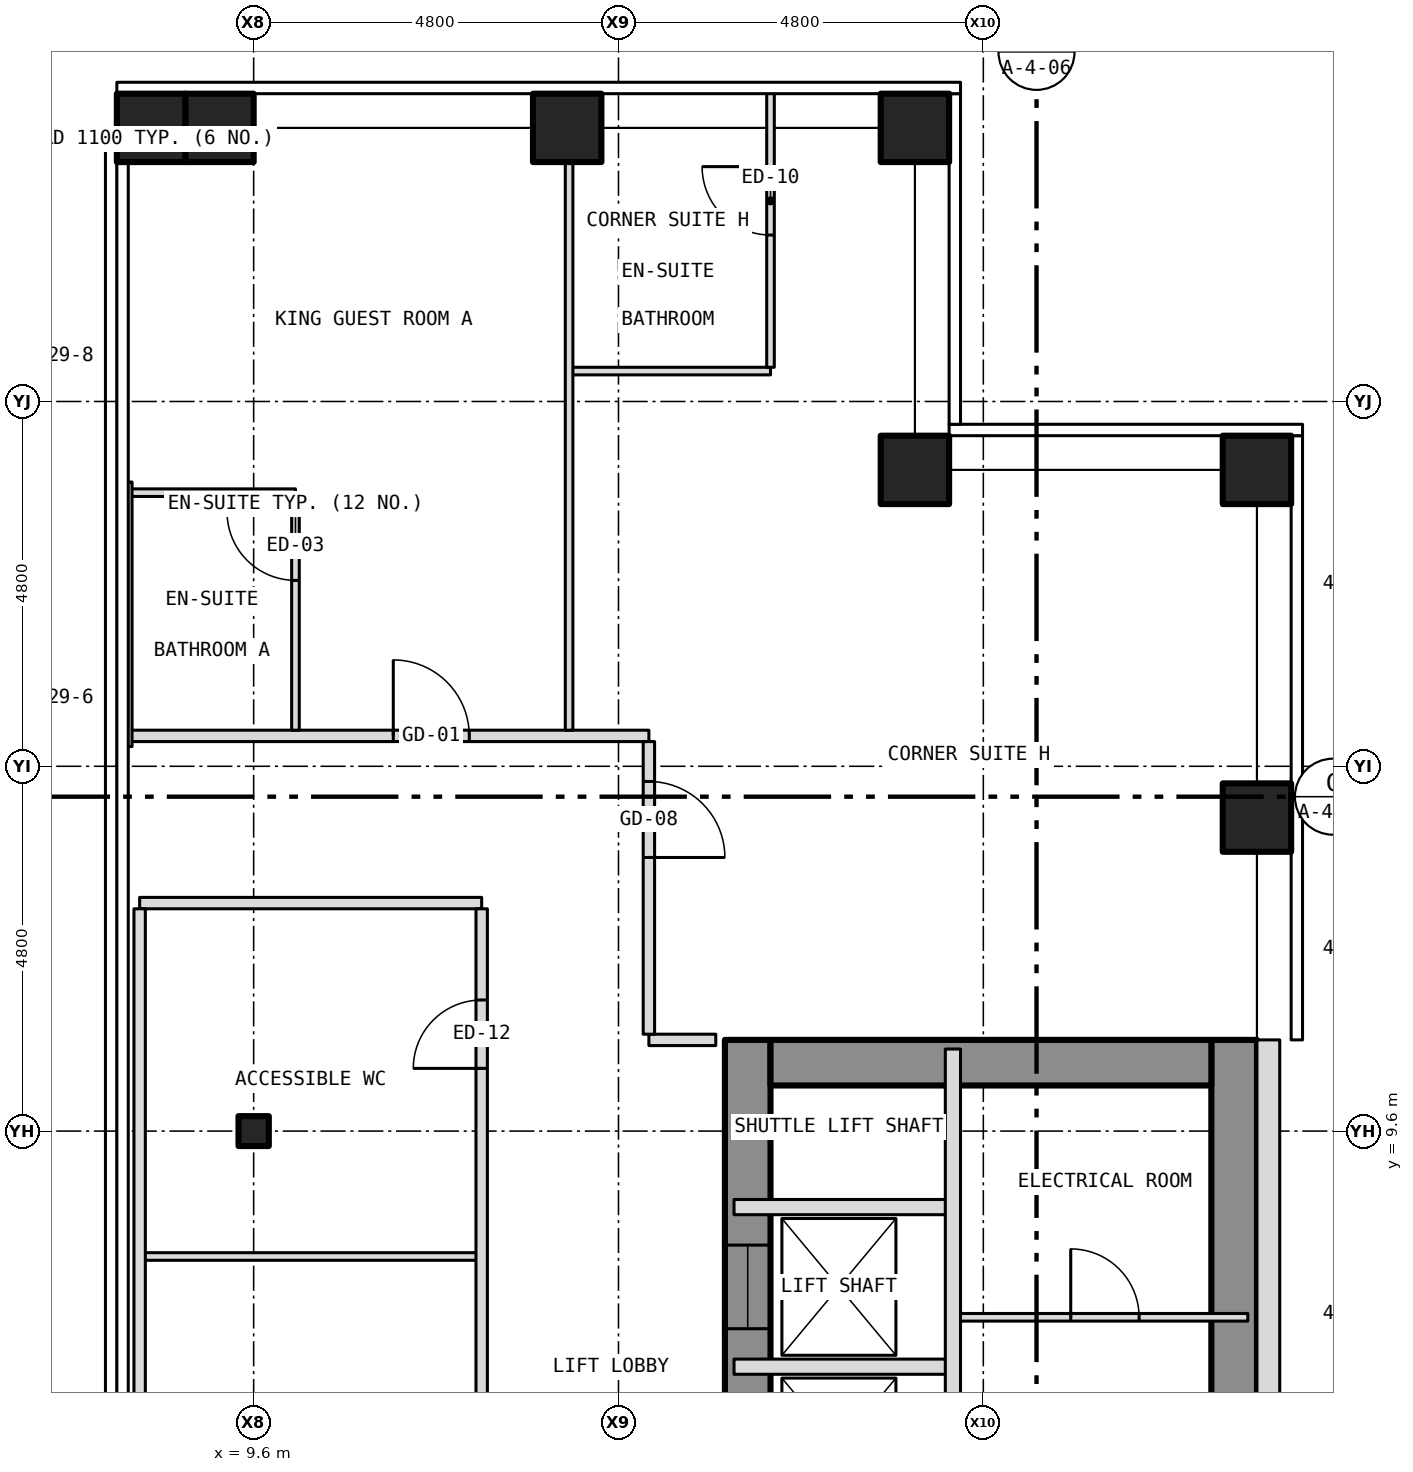
"""IFC4 building model, lengths in metres.
Left out: names, types, materials, properties, quantities, classifications, styles, units other than length and angle.
Written with IfcOpenShell. Run it as: python <this file> out.ifc"""

import sys

from ifc_helpers import new_model, si_unit, direction, frame, frame_2d, origin, origin_2d, place, context, subcontext, project, spatial, rectangle, hollow_rectangle, i_section, extrude, element, fill, save


model = new_model("IFC4")
c1 = context("Model", 3, precision=1e-05, world=origin(), true_north=direction((0.0, 1.0)))
c2 = subcontext(c1, "Body", "Model", "MODEL_VIEW")
j1 = project(units=[si_unit("LENGTHUNIT", "METRE"), si_unit("PLANEANGLEUNIT", "RADIAN")], contexts=[c1])
p1 = place(None, origin())
s1 = spatial("IfcSite", under=j1, at=p1, CompositionType="ELEMENT")
p2 = place(p1, origin())
s2 = spatial("IfcBuilding", under=s1, at=p2, CompositionType="ELEMENT")
p3 = place(p2, frame((0.0, 0.0, 117.0)))
s3 = spatial("IfcBuildingStorey", under=s2, at=p3, CompositionType="ELEMENT", Elevation=117.0)
for number, where, z_axis, x_axis in (
    (1, (9.15, 22.8, -0.15), (0.0, 0.0, 1.0), (1.0, 0.0, 0.0)),
    (2, (13.725, 22.8, -0.15), (0.0, 0.0, 1.0), (1.0, 0.0, 0.0)),
    (3, (18.3, 22.8, -0.15), (0.0, 0.0, 1.0), (1.0, 0.0, 0.0)),
    (4, (22.8, 13.725, -0.15), (0.0, 0.0, 1.0), (1.0, 0.0, 0.0)),
    (5, (22.8, 18.3, -0.15), (0.0, 0.0, 1.0), (1.0, 0.0, 0.0)),
    (6, (18.3, 18.3, -0.15), (0.0, 0.0, 1.0), (1.0, 0.0, 0.0)),
    (7, (8.25, 22.8, -0.15), (0.0, 0.0, 1.0), (1.0, 0.0, 0.0)),
):
    element("IfcColumn", number, at=place(p3, frame(where, z_axis=z_axis, x_axis=x_axis)), inside=s3, PredefinedType="COLUMN", context=c2, shape_type="SweptSolid", body=[
        extrude(hollow_rectangle(XDim=0.9, YDim=0.9, WallThickness=0.05, at=origin_2d()), origin(), (0.0, 0.0, 1.0), 3.5),
    ])
p4 = place(p3, frame((9.6, 9.6, -0.15), z_axis=(0.0, 0.0, 1.0), x_axis=(1.0, 0.0, 0.0)))
e8 = element("IfcColumn", 8, at=p4, inside=s3, PredefinedType="COLUMN", context=c2, shape_type="SweptSolid", body=[
    extrude(i_section(OverallWidth=0.399, OverallDepth=0.394, WebThickness=0.023, FlangeThickness=0.037, at=origin_2d()), origin(), (0.0, 0.0, 1.0), 3.5),
])
p5 = place(p3, frame((16.1, -10.8, 0.0), z_axis=(0.0, 0.0, 1.0), x_axis=(0.0, 1.0, 0.0)))
e9 = element("IfcWall", 9, at=p5, inside=s3, PredefinedType="SHEAR", context=c2, shape_type="SweptSolid", body=[
    extrude(rectangle(XDim=21.6, YDim=0.6, at=frame_2d((10.8, 0.0))), origin(), (0.0, 0.0, 1.0), 3.25),
])
p6 = place(p5, frame((9.4, 0.0, 0.0)))
e10 = element("IfcOpeningElement", 10, at=p6, cuts=e9, PredefinedType="OPENING", context=c2, shape_type="SweptSolid", body=[
    extrude(rectangle(XDim=1.1, YDim=2.1, at=frame_2d((0.55, 1.05))), frame((0.0, 0.312, 0.0), z_axis=(0.0, -1.0, 0.0), x_axis=(1.0, 0.0, 0.0)), (0.0, 0.0, 1.0), 0.624),
])
p7 = place(p5, frame((11.5, 0.0, 0.0)))
e11 = element("IfcOpeningElement", 11, at=p7, cuts=e9, PredefinedType="OPENING", context=c2, shape_type="SweptSolid", body=[
    extrude(rectangle(XDim=1.1, YDim=2.1, at=frame_2d((0.55, 1.05))), frame((0.0, 0.312, 0.0), z_axis=(0.0, -1.0, 0.0), x_axis=(1.0, 0.0, 0.0)), (0.0, 0.0, 1.0), 0.624),
])
p8 = place(p5, frame((13.6, 0.0, 0.0)))
e12 = element("IfcOpeningElement", 12, at=p8, cuts=e9, PredefinedType="OPENING", context=c2, shape_type="SweptSolid", body=[
    extrude(rectangle(XDim=1.1, YDim=2.1, at=frame_2d((0.55, 1.05))), frame((0.0, 0.312, 0.0), z_axis=(0.0, -1.0, 0.0), x_axis=(1.0, 0.0, 0.0)), (0.0, 0.0, 1.0), 0.624),
])
p9 = place(p5, frame((15.7, 0.0, 0.0)))
e13 = element("IfcOpeningElement", 13, at=p9, cuts=e9, PredefinedType="OPENING", context=c2, shape_type="SweptSolid", body=[
    extrude(rectangle(XDim=1.1, YDim=2.1, at=frame_2d((0.55, 1.05))), frame((0.0, 0.312, 0.0), z_axis=(0.0, -1.0, 0.0), x_axis=(1.0, 0.0, 0.0)), (0.0, 0.0, 1.0), 0.624),
])
p10 = place(p5, frame((17.8, 0.0, 0.0)))
e14 = element("IfcOpeningElement", 14, at=p10, cuts=e9, PredefinedType="OPENING", context=c2, shape_type="SweptSolid", body=[
    extrude(rectangle(XDim=1.1, YDim=2.1, at=frame_2d((0.55, 1.05))), frame((0.0, 0.312, 0.0), z_axis=(0.0, -1.0, 0.0), x_axis=(1.0, 0.0, 0.0)), (0.0, 0.0, 1.0), 0.624),
])
p11 = place(p5, frame((5.642, 0.0, 0.0)))
e15 = element("IfcOpeningElement", 15, at=p11, cuts=e9, PredefinedType="OPENING", context=c2, shape_type="SweptSolid", body=[
    extrude(rectangle(XDim=1.1, YDim=2.1, at=frame_2d((0.55, 1.05))), frame((0.0, 0.312, 0.0), z_axis=(0.0, -1.0, 0.0), x_axis=(1.0, 0.0, 0.0)), (0.0, 0.0, 1.0), 0.624),
])
p12 = place(p5, frame((7.5, 0.0, 0.0)))
e16 = element("IfcOpeningElement", 16, at=p12, cuts=e9, PredefinedType="OPENING", context=c2, shape_type="SweptSolid", body=[
    extrude(rectangle(XDim=1.1, YDim=2.1, at=frame_2d((0.55, 1.05))), frame((0.0, 0.312, 0.0), z_axis=(0.0, -1.0, 0.0), x_axis=(1.0, 0.0, 0.0)), (0.0, 0.0, 1.0), 0.624),
])
p13 = place(p3, frame((22.5, -10.8, 0.0), z_axis=(0.0, 0.0, 1.0), x_axis=(0.0, 1.0, 0.0)))
e17 = element("IfcWall", 17, at=p13, inside=s3, PredefinedType="SHEAR", context=c2, shape_type="SweptSolid", body=[
    extrude(rectangle(XDim=21.6, YDim=0.6, at=frame_2d((10.8, 0.0))), origin(), (0.0, 0.0, 1.0), 3.25),
])
p14 = place(p3, frame((16.4, 10.5, 0.0), z_axis=(0.0, 0.0, 1.0), x_axis=(1.0, 0.0, 0.0)))
e18 = element("IfcWall", 18, at=p14, inside=s3, PredefinedType="SHEAR", context=c2, shape_type="SweptSolid", body=[
    extrude(rectangle(XDim=5.8, YDim=0.6, at=frame_2d((2.9, 0.0))), origin(), (0.0, 0.0, 1.0), 3.25),
])
p15 = place(p3, frame((22.95, -10.8, 0.0), z_axis=(0.0, 0.0, 1.0), x_axis=(0.0, 1.0, 0.0)))
e19 = element("IfcWall", 19, at=p15, inside=s3, PredefinedType="SOLIDWALL", context=c2, shape_type="SweptSolid", body=[
    extrude(rectangle(XDim=21.6, YDim=0.3, at=frame_2d((10.8, 0.0))), origin(), (0.0, 0.0, 1.0), 3.5),
])
p16 = place(p15, frame((2.95, 0.0, 1.0)))
e20 = element("IfcOpeningElement", 20, at=p16, cuts=e19, PredefinedType="OPENING", context=c2, shape_type="SweptSolid", body=[
    extrude(rectangle(XDim=0.6, YDim=1.5, at=frame_2d((0.3, 0.75))), frame((0.0, 0.162, 0.0), z_axis=(0.0, -1.0, 0.0), x_axis=(1.0, 0.0, 0.0)), (0.0, 0.0, 1.0), 0.324),
])
p17 = place(p3, frame((15.92, 6.5, 0.0), z_axis=(0.0, 0.0, 1.0), x_axis=(1.0, 0.0, 0.0)))
e21 = element("IfcWall", 21, at=p17, inside=s3, PredefinedType="PARTITIONING", context=c2, shape_type="SweptSolid", body=[
    extrude(rectangle(XDim=2.88, YDim=0.2, at=frame_2d((1.44, 0.0))), origin(), (0.0, 0.0, 1.0), 3.25),
])
p18 = place(p3, frame((18.8, 7.15, 0.0), z_axis=(0.0, 0.0, 1.0), x_axis=(1.0, 0.0, 0.0)))
e22 = element("IfcWall", 22, at=p18, inside=s3, PredefinedType="PARTITIONING", context=c2, shape_type="SweptSolid", body=[
    extrude(rectangle(XDim=3.88, YDim=0.1, at=frame_2d((1.94, 0.0))), origin(), (0.0, 0.0, 1.0), 3.25),
])
p19 = place(p18, frame((1.55, 0.0, 0.0)))
e23 = element("IfcOpeningElement", 23, at=p19, cuts=e22, PredefinedType="OPENING", context=c2, shape_type="SweptSolid", body=[
    extrude(rectangle(XDim=0.9, YDim=2.1, at=frame_2d((0.45, 1.05))), frame((0.0, 0.062, 0.0), z_axis=(0.0, -1.0, 0.0), x_axis=(1.0, 0.0, 0.0)), (0.0, 0.0, 1.0), 0.124),
])
p20 = place(p3, frame((8.1, 7.95, 0.0), z_axis=(0.0, 0.0, 1.0), x_axis=(1.0, 0.0, 0.0)))
e24 = element("IfcWall", 24, at=p20, inside=s3, PredefinedType="PARTITIONING", context=c2, shape_type="SweptSolid", body=[
    extrude(rectangle(XDim=4.5, YDim=0.1, at=frame_2d((2.25, 0.0))), origin(), (0.0, 0.0, 1.0), 3.35),
])
p21 = place(p3, frame((15.92, 8.6, 0.0), z_axis=(0.0, 0.0, 1.0), x_axis=(1.0, 0.0, 0.0)))
e25 = element("IfcWall", 25, at=p21, inside=s3, PredefinedType="PARTITIONING", context=c2, shape_type="SweptSolid", body=[
    extrude(rectangle(XDim=2.88, YDim=0.2, at=frame_2d((1.44, 0.0))), origin(), (0.0, 0.0, 1.0), 3.25),
])
p22 = place(p3, frame((14.8, 10.8, 0.0), z_axis=(0.0, 0.0, 1.0), x_axis=(1.0, 0.0, 0.0)))
e26 = element("IfcWall", 26, at=p22, inside=s3, PredefinedType="PARTITIONING", context=c2, shape_type="SweptSolid", body=[
    extrude(rectangle(XDim=0.88, YDim=0.15, at=frame_2d((0.44, 0.0))), origin(), (0.0, 0.0, 1.0), 3.35),
])
p23 = place(p3, frame((8.1, 12.6, 0.0), z_axis=(0.0, 0.0, 1.0), x_axis=(1.0, 0.0, 0.0)))
e27 = element("IfcWall", 27, at=p23, inside=s3, PredefinedType="PARTITIONING", context=c2, shape_type="SweptSolid", body=[
    extrude(rectangle(XDim=4.5, YDim=0.15, at=frame_2d((2.25, 0.0))), origin(), (0.0, 0.0, 1.0), 3.35),
])
p24 = place(p3, frame((7.95, 14.8, 0.0), z_axis=(0.0, 0.0, 1.0), x_axis=(1.0, 0.0, 0.0)))
e28 = element("IfcWall", 28, at=p24, inside=s3, PredefinedType="PARTITIONING", context=c2, shape_type="SweptSolid", body=[
    extrude(rectangle(XDim=6.85, YDim=0.15, at=frame_2d((3.425, 0.0))), origin(), (0.0, 0.0, 1.0), 3.35),
])
p25 = place(p24, frame((3.487, 0.0, 0.0)))
e29 = element("IfcOpeningElement", 29, at=p25, cuts=e28, PredefinedType="OPENING", context=c2, shape_type="SweptSolid", body=[
    extrude(rectangle(XDim=1.0, YDim=2.1, at=frame_2d((0.5, 1.05))), frame((0.0, 0.087, 0.0), z_axis=(0.0, -1.0, 0.0), x_axis=(1.0, 0.0, 0.0)), (0.0, 0.0, 1.0), 0.174),
])
p26 = place(p3, frame((7.95, 18.0, 0.0), z_axis=(0.0, 0.0, 1.0), x_axis=(1.0, 0.0, 0.0)))
e30 = element("IfcWall", 30, at=p26, inside=s3, PredefinedType="PARTITIONING", context=c2, shape_type="SweptSolid", body=[
    extrude(rectangle(XDim=2.2, YDim=0.1, at=frame_2d((1.1, 0.0))), origin(), (0.0, 0.0, 1.0), 3.35),
])
p27 = place(p3, frame((13.75, 19.6, 0.0), z_axis=(0.0, 0.0, 1.0), x_axis=(1.0, 0.0, 0.0)))
e31 = element("IfcWall", 31, at=p27, inside=s3, PredefinedType="PARTITIONING", context=c2, shape_type="SweptSolid", body=[
    extrude(rectangle(XDim=2.65, YDim=0.1, at=frame_2d((1.325, 0.0))), origin(), (0.0, 0.0, 1.0), 3.35),
])
p28 = place(p3, frame((7.95, 14.66, 0.0), z_axis=(0.0, 0.0, 1.0), x_axis=(0.0, 1.0, 0.0)))
e32 = element("IfcWall", 32, at=p28, inside=s3, PredefinedType="PARTITIONING", context=c2, shape_type="SweptSolid", body=[
    extrude(rectangle(XDim=3.48, YDim=0.1, at=frame_2d((1.74, 0.0))), origin(), (0.0, 0.0, 1.0), 2.733),
])
p29 = place(p3, frame((8.1, 3.375, 0.0), z_axis=(0.0, 0.0, 1.0), x_axis=(0.0, 1.0, 0.0)))
e33 = element("IfcWall", 33, at=p29, inside=s3, PredefinedType="PARTITIONING", context=c2, shape_type="SweptSolid", body=[
    extrude(rectangle(XDim=9.15, YDim=0.15, at=frame_2d((4.575, 0.0))), origin(), (0.0, 0.0, 1.0), 3.35),
])
p30 = place(p3, frame((10.15, 14.875, 0.0), z_axis=(0.0, 0.0, 1.0), x_axis=(0.0, 1.0, 0.0)))
e34 = element("IfcWall", 34, at=p30, inside=s3, PredefinedType="PARTITIONING", context=c2, shape_type="SweptSolid", body=[
    extrude(rectangle(XDim=3.075, YDim=0.1, at=frame_2d((1.538, 0.0))), origin(), (0.0, 0.0, 1.0), 3.35),
])
p31 = place(p30, frame((1.971, 0.0, 0.0)))
e35 = element("IfcOpeningElement", 35, at=p31, cuts=e34, PredefinedType="OPENING", context=c2, shape_type="SweptSolid", body=[
    extrude(rectangle(XDim=0.9, YDim=2.1, at=frame_2d((0.45, 1.05))), frame((0.0, 0.062, 0.0), z_axis=(0.0, -1.0, 0.0), x_axis=(1.0, 0.0, 0.0)), (0.0, 0.0, 1.0), 0.124),
])
p32 = place(p3, frame((12.6, 3.375, 0.0), z_axis=(0.0, 0.0, 1.0), x_axis=(0.0, 1.0, 0.0)))
e36 = element("IfcWall", 36, at=p32, inside=s3, PredefinedType="PARTITIONING", context=c2, shape_type="SweptSolid", body=[
    extrude(rectangle(XDim=9.15, YDim=0.15, at=frame_2d((4.575, 0.0))), origin(), (0.0, 0.0, 1.0), 3.35),
])
p33 = place(p32, frame((7.05, 0.0, 0.0)))
e37 = element("IfcOpeningElement", 37, at=p33, cuts=e36, PredefinedType="OPENING", context=c2, shape_type="SweptSolid", body=[
    extrude(rectangle(XDim=0.9, YDim=2.1, at=frame_2d((0.45, 1.05))), frame((0.0, 0.087, 0.0), z_axis=(0.0, -1.0, 0.0), x_axis=(1.0, 0.0, 0.0)), (0.0, 0.0, 1.0), 0.174),
])
p34 = place(p3, frame((13.75, 14.875, 0.0), z_axis=(0.0, 0.0, 1.0), x_axis=(0.0, 1.0, 0.0)))
e38 = element("IfcWall", 38, at=p34, inside=s3, PredefinedType="PARTITIONING", context=c2, shape_type="SweptSolid", body=[
    extrude(rectangle(XDim=7.805, YDim=0.1, at=frame_2d((3.902, 0.0))), origin(), (0.0, 0.0, 1.0), 3.35),
])
p35 = place(p3, frame((14.8, 10.875, 0.0), z_axis=(0.0, 0.0, 1.0), x_axis=(0.0, 1.0, 0.0)))
e39 = element("IfcWall", 39, at=p35, inside=s3, PredefinedType="PARTITIONING", context=c2, shape_type="SweptSolid", body=[
    extrude(rectangle(XDim=3.85, YDim=0.15, at=frame_2d((1.925, 0.0))), origin(), (0.0, 0.0, 1.0), 3.35),
])
p36 = place(p35, frame((2.325, 0.0, 0.0)))
e40 = element("IfcOpeningElement", 40, at=p36, cuts=e39, PredefinedType="OPENING", context=c2, shape_type="SweptSolid", body=[
    extrude(rectangle(XDim=1.0, YDim=2.1, at=frame_2d((0.5, 1.05))), frame((0.0, 0.087, 0.0), z_axis=(0.0, -1.0, 0.0), x_axis=(1.0, 0.0, 0.0)), (0.0, 0.0, 1.0), 0.174),
])
p37 = place(p3, frame((16.4, 19.65, 0.0), z_axis=(0.0, 0.0, 1.0), x_axis=(0.0, 1.0, 0.0)))
e41 = element("IfcWall", 41, at=p37, inside=s3, PredefinedType="PARTITIONING", context=c2, shape_type="SweptSolid", body=[
    extrude(rectangle(XDim=3.63, YDim=0.1, at=frame_2d((1.815, 0.0))), origin(), (0.0, 0.0, 1.0), 3.35),
])
p38 = place(p37, frame((1.74, 0.0, 0.0)))
e42 = element("IfcOpeningElement", 42, at=p38, cuts=e41, PredefinedType="OPENING", context=c2, shape_type="SweptSolid", body=[
    extrude(rectangle(XDim=0.9, YDim=2.1, at=frame_2d((0.45, 1.05))), frame((0.0, 0.062, 0.0), z_axis=(0.0, -1.0, 0.0), x_axis=(1.0, 0.0, 0.0)), (0.0, 0.0, 1.0), 0.124),
])
p39 = place(p3, frame((18.8, -1.8, 0.0), z_axis=(0.0, 0.0, 1.0), x_axis=(0.0, 1.0, 0.0)))
e43 = element("IfcWall", 43, at=p39, inside=s3, PredefinedType="PARTITIONING", context=c2, shape_type="SweptSolid", body=[
    extrude(rectangle(XDim=12.48, YDim=0.2, at=frame_2d((6.24, 0.0))), origin(), (0.0, 0.0, 1.0), 3.25),
])
p40 = place(p10, origin())
e44 = element("IfcDoor", 44, at=p40, inside=s3, OperationType="SLIDING_TO_LEFT", PredefinedType="DOOR", context=c2, shape_type="SweptSolid", body=[
    extrude(rectangle(XDim=1.1, YDim=2.1, at=frame_2d((0.55, 1.05))), frame((0.0, 0.025, 0.0), z_axis=(0.0, -1.0, 0.0), x_axis=(1.0, 0.0, 0.0)), (0.0, 0.0, 1.0), 0.05),
])
fill(e14, e44)
p41 = place(p19, origin())
e45 = element("IfcDoor", 45, at=p41, inside=s3, OperationType="SINGLE_SWING_LEFT", PredefinedType="DOOR", context=c2, shape_type="SweptSolid", body=[
    extrude(rectangle(XDim=0.9, YDim=2.1, at=frame_2d((0.45, 1.05))), frame((0.0, 0.025, 0.0), z_axis=(0.0, -1.0, 0.0), x_axis=(1.0, 0.0, 0.0)), (0.0, 0.0, 1.0), 0.05),
])
fill(e23, e45)
p42 = place(p25, origin())
e46 = element("IfcDoor", 46, at=p42, inside=s3, OperationType="SINGLE_SWING_LEFT", PredefinedType="DOOR", context=c2, shape_type="SweptSolid", body=[
    extrude(rectangle(XDim=1.0, YDim=2.1, at=frame_2d((0.5, 1.05))), frame((0.0, 0.025, 0.0), z_axis=(0.0, -1.0, 0.0), x_axis=(1.0, 0.0, 0.0)), (0.0, 0.0, 1.0), 0.05),
])
fill(e29, e46)
p43 = place(p31, origin())
e47 = element("IfcDoor", 47, at=p43, inside=s3, OperationType="SINGLE_SWING_RIGHT", PredefinedType="DOOR", context=c2, shape_type="SweptSolid", body=[
    extrude(rectangle(XDim=0.9, YDim=2.1, at=frame_2d((0.45, 1.05))), frame((0.0, 0.025, 0.0), z_axis=(0.0, -1.0, 0.0), x_axis=(1.0, 0.0, 0.0)), (0.0, 0.0, 1.0), 0.05),
])
fill(e35, e47)
p44 = place(p38, origin())
e48 = element("IfcDoor", 48, at=p44, inside=s3, OperationType="SINGLE_SWING_RIGHT", PredefinedType="DOOR", context=c2, shape_type="SweptSolid", body=[
    extrude(rectangle(XDim=0.9, YDim=2.1, at=frame_2d((0.45, 1.05))), frame((0.0, 0.025, 0.0), z_axis=(0.0, -1.0, 0.0), x_axis=(1.0, 0.0, 0.0)), (0.0, 0.0, 1.0), 0.05),
])
fill(e42, e48)
p45 = place(p36, origin())
e49 = element("IfcDoor", 49, at=p45, inside=s3, OperationType="SINGLE_SWING_LEFT", PredefinedType="DOOR", context=c2, shape_type="SweptSolid", body=[
    extrude(rectangle(XDim=1.0, YDim=2.1, at=frame_2d((0.5, 1.05))), frame((0.0, 0.025, 0.0), z_axis=(0.0, -1.0, 0.0), x_axis=(1.0, 0.0, 0.0)), (0.0, 0.0, 1.0), 0.05),
])
fill(e40, e49)
p46 = place(p33, origin())
e50 = element("IfcDoor", 50, at=p46, inside=s3, OperationType="SINGLE_SWING_LEFT", PredefinedType="DOOR", context=c2, shape_type="SweptSolid", body=[
    extrude(rectangle(XDim=0.9, YDim=2.1, at=frame_2d((0.45, 1.05))), frame((0.0, 0.025, 0.0), z_axis=(0.0, -1.0, 0.0), x_axis=(1.0, 0.0, 0.0)), (0.0, 0.0, 1.0), 0.05),
])
fill(e37, e50)
save(model, sys.argv[1])
